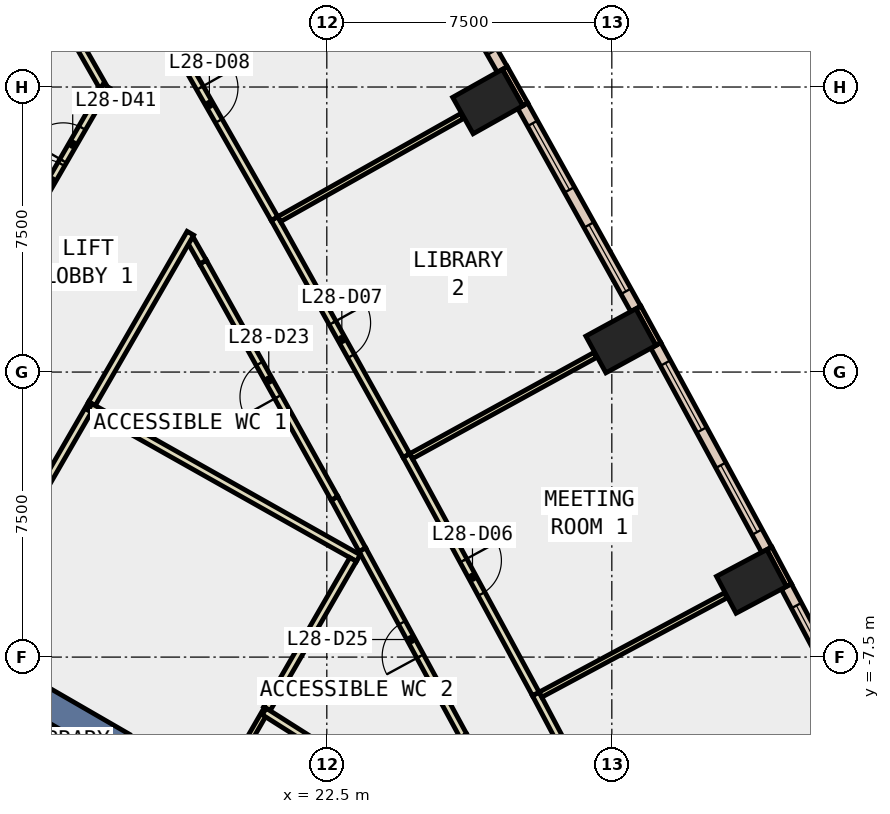
"""IFC4 building model, lengths in metres.
Left out: names, types, materials, properties, quantities, classifications, styles, units other than length and angle.
Written with IfcOpenShell. Run it as: python <this file> out.ifc"""

import sys

from ifc_helpers import new_model, si_unit, direction, frame, frame_2d, origin, origin_2d, place, context, subcontext, project, spatial, rectangle, extrude, element, fill, save


model = new_model("IFC4")
c1 = context("Model", 3, precision=1e-05, world=origin(), true_north=direction((0.0, 1.0)))
c2 = subcontext(c1, "Body", "Model", "MODEL_VIEW")
j1 = project(units=[si_unit("LENGTHUNIT", "METRE"), si_unit("PLANEANGLEUNIT", "RADIAN")], contexts=[c1])
p1 = place(None, origin())
s1 = spatial("IfcSite", under=j1, at=p1, CompositionType="ELEMENT")
p2 = place(p1, origin())
s2 = spatial("IfcBuilding", under=s1, at=p2, CompositionType="ELEMENT")
p3 = place(p2, frame((0.0, 0.0, 128.6)))
s3 = spatial("IfcBuildingStorey", under=s2, at=p3, CompositionType="ELEMENT", Elevation=128.6)
for number, where, z_axis, x_axis in (
    (1, (33.674, -5.509, -0.4), (0.0, 0.0, 1.0), (-0.469, 0.883, 0.0)),
    (2, (30.238, 0.822, -0.4), (0.0, 0.0, 1.0), (-0.48, 0.877, 0.0)),
    (3, (26.735, 7.117, -0.4), (0.0, 0.0, 1.0), (-0.49, 0.872, 0.0)),
):
    element("IfcColumn", number, at=place(p3, frame(where, z_axis=z_axis, x_axis=x_axis)), inside=s3, PredefinedType="COLUMN", context=c2, shape_type="SweptSolid", body=[
        extrude(rectangle(XDim=1.1, YDim=1.5, at=origin_2d()), origin(), (0.0, 0.0, 1.0), 4.0),
    ])
p4 = place(p3, frame((9.31, -5.375, -0.4), z_axis=(0.0, 0.0, 1.0), x_axis=(0.866017533419, -0.500013631625, 0.0)))
e4 = element("IfcWall", 4, at=p4, inside=s3, PredefinedType="SHEAR", context=c2, shape_type="SweptSolid", body=[
    extrude(rectangle(XDim=9.0, YDim=0.8, at=frame_2d((4.5, 0.0))), origin(), (0.0, 0.0, 1.0), 4.0),
])
p5 = place(p3, frame((34.661, -5.608, 0.0), z_axis=(0.0, 0.0, 1.0), x_axis=(-0.46919310775, 0.883095593716, 0.0)))
e5 = element("IfcWall", 5, at=p5, inside=s3, PredefinedType="STANDARD", context=c2, shape_type="SweptSolid", body=[
    extrude(rectangle(XDim=1.099, YDim=0.15, at=frame_2d((0.55, 0.0))), origin(), (0.0, 0.0, 1.0), 3.6),
])
p6 = place(p3, frame((31.226, 0.735, 0.0), z_axis=(0.0, 0.0, 1.0), x_axis=(-0.479737645119, 0.877411985247, 0.0)))
e6 = element("IfcWall", 6, at=p6, inside=s3, PredefinedType="STANDARD", context=c2, shape_type="SweptSolid", body=[
    extrude(rectangle(XDim=1.101, YDim=0.15, at=frame_2d((0.55, 0.0))), origin(), (0.0, 0.0, 1.0), 3.6),
])
p7 = place(p3, frame((27.724, 7.042, 0.0), z_axis=(0.0, 0.0, 1.0), x_axis=(-0.490008344094, 0.871717742574, 0.0)))
e7 = element("IfcWall", 7, at=p7, inside=s3, PredefinedType="STANDARD", context=c2, shape_type="SweptSolid", body=[
    extrude(rectangle(XDim=1.1, YDim=0.15, at=frame_2d((0.55, 0.0))), origin(), (0.0, 0.0, 1.0), 3.6),
])
p8 = place(p3, frame((37.523, -11.181, 0.0), z_axis=(0.0, 0.0, 1.0), x_axis=(-0.467654949391, 0.883911108828, 0.0)))
e8 = element("IfcWall", 8, at=p8, inside=s3, PredefinedType="STANDARD", context=c2, shape_type="SweptSolid", body=[
    extrude(rectangle(XDim=6.265, YDim=0.3, at=frame_2d((3.133, 0.0))), origin(), (0.0, 0.0, 1.0), 3.6),
])
p9 = place(p8, frame((0.566, 0.0, 0.9)))
e9 = element("IfcOpeningElement", 9, at=p9, cuts=e8, PredefinedType="OPENING", context=c2, shape_type="SweptSolid", body=[
    extrude(rectangle(XDim=2.0, YDim=2.6, at=frame_2d((1.0, 1.3))), frame((0.0, 0.16, 0.0), z_axis=(0.0, -1.0, 0.0), x_axis=(1.0, 0.0, 0.0)), (0.0, 0.0, 1.0), 0.32),
])
p10 = place(p8, frame((3.699, 0.0, 0.9)))
e10 = element("IfcOpeningElement", 10, at=p10, cuts=e8, PredefinedType="OPENING", context=c2, shape_type="SweptSolid", body=[
    extrude(rectangle(XDim=2.0, YDim=2.6, at=frame_2d((1.0, 1.3))), frame((0.0, 0.16, 0.0), z_axis=(0.0, -1.0, 0.0), x_axis=(1.0, 0.0, 0.0)), (0.0, 0.0, 1.0), 0.32),
])
p11 = place(p3, frame((34.075, -4.675, 0.0), z_axis=(0.0, 0.0, 1.0), x_axis=(-0.476982616152, 0.878912728255, 0.0)))
e11 = element("IfcWall", 11, at=p11, inside=s3, PredefinedType="STANDARD", context=c2, shape_type="SweptSolid", body=[
    extrude(rectangle(XDim=6.115, YDim=0.3, at=frame_2d((3.058, 0.0))), origin(), (0.0, 0.0, 1.0), 3.6),
])
p12 = place(p11, frame((0.529, 0.0, 0.9)))
e12 = element("IfcOpeningElement", 12, at=p12, cuts=e11, PredefinedType="OPENING", context=c2, shape_type="SweptSolid", body=[
    extrude(rectangle(XDim=2.0, YDim=2.6, at=frame_2d((1.0, 1.3))), frame((0.0, 0.16, 0.0), z_axis=(0.0, -1.0, 0.0), x_axis=(1.0, 0.0, 0.0)), (0.0, 0.0, 1.0), 0.32),
])
p13 = place(p11, frame((3.587, 0.0, 0.9)))
e13 = element("IfcOpeningElement", 13, at=p13, cuts=e11, PredefinedType="OPENING", context=c2, shape_type="SweptSolid", body=[
    extrude(rectangle(XDim=2.0, YDim=2.6, at=frame_2d((1.0, 1.3))), frame((0.0, 0.16, 0.0), z_axis=(0.0, -1.0, 0.0), x_axis=(1.0, 0.0, 0.0)), (0.0, 0.0, 1.0), 0.32),
])
p14 = place(p3, frame((30.629, 1.662, 0.0), z_axis=(0.0, 0.0, 1.0), x_axis=(-0.486229342917, 0.873831234327, 0.0)))
e14 = element("IfcWall", 14, at=p14, inside=s3, PredefinedType="STANDARD", context=c2, shape_type="SweptSolid", body=[
    extrude(rectangle(XDim=6.114, YDim=0.3, at=frame_2d((3.057, 0.0))), origin(), (0.0, 0.0, 1.0), 3.6),
])
p15 = place(p14, frame((0.529, 0.0, 0.9)))
e15 = element("IfcOpeningElement", 15, at=p15, cuts=e14, PredefinedType="OPENING", context=c2, shape_type="SweptSolid", body=[
    extrude(rectangle(XDim=2.0, YDim=2.6, at=frame_2d((1.0, 1.3))), frame((0.0, 0.16, 0.0), z_axis=(0.0, -1.0, 0.0), x_axis=(1.0, 0.0, 0.0)), (0.0, 0.0, 1.0), 0.32),
])
p16 = place(p14, frame((3.586, 0.0, 0.9)))
e16 = element("IfcOpeningElement", 16, at=p16, cuts=e14, PredefinedType="OPENING", context=c2, shape_type="SweptSolid", body=[
    extrude(rectangle(XDim=2.0, YDim=2.6, at=frame_2d((1.0, 1.3))), frame((0.0, 0.16, 0.0), z_axis=(0.0, -1.0, 0.0), x_axis=(1.0, 0.0, 0.0)), (0.0, 0.0, 1.0), 0.32),
])
p17 = place(p3, frame((27.117, 7.961, 0.0), z_axis=(0.0, 0.0, 1.0), x_axis=(-0.495472401298, 0.868623681206, 0.0)))
e17 = element("IfcWall", 17, at=p17, inside=s3, PredefinedType="STANDARD", context=c2, shape_type="SweptSolid", body=[
    extrude(rectangle(XDim=6.115, YDim=0.3, at=frame_2d((3.058, 0.0))), origin(), (0.0, 0.0, 1.0), 3.6),
])
p18 = place(p17, frame((0.529, 0.0, 0.9)))
e18 = element("IfcOpeningElement", 18, at=p18, cuts=e17, PredefinedType="OPENING", context=c2, shape_type="SweptSolid", body=[
    extrude(rectangle(XDim=2.0, YDim=2.6, at=frame_2d((1.0, 1.3))), frame((0.0, 0.16, 0.0), z_axis=(0.0, -1.0, 0.0), x_axis=(1.0, 0.0, 0.0)), (0.0, 0.0, 1.0), 0.32),
])
p19 = place(p17, frame((3.587, 0.0, 0.9)))
e19 = element("IfcOpeningElement", 19, at=p19, cuts=e17, PredefinedType="OPENING", context=c2, shape_type="SweptSolid", body=[
    extrude(rectangle(XDim=2.0, YDim=2.6, at=frame_2d((1.0, 1.3))), frame((0.0, 0.16, 0.0), z_axis=(0.0, -1.0, 0.0), x_axis=(1.0, 0.0, 0.0)), (0.0, 0.0, 1.0), 0.32),
])
p20 = place(p3, frame((16.601, 7.526, 0.0), z_axis=(0.0, 0.0, 1.0), x_axis=(-0.495652400286, 0.868520983103, 0.0)))
e20 = element("IfcWall", 20, at=p20, inside=s3, PredefinedType="PARTITIONING", context=c2, shape_type="SweptSolid", body=[
    extrude(rectangle(XDim=1.784, YDim=0.2, at=frame_2d((0.892, 0.0))), origin(), (0.0, 0.0, 1.0), 3.6),
])
p21 = place(p3, frame((23.437, -4.676, 0.0), z_axis=(0.0, 0.0, 1.0), x_axis=(-0.47686467088, 0.878976726465, 0.0)))
e21 = element("IfcWall", 21, at=p21, inside=s3, PredefinedType="PARTITIONING", context=c2, shape_type="SweptSolid", body=[
    extrude(rectangle(XDim=1.542, YDim=0.2, at=frame_2d((0.771, 0.0))), origin(), (0.0, 0.0, 1.0), 3.6),
])
p22 = place(p3, frame((22.702, -3.321, 0.0), z_axis=(0.0, 0.0, 1.0), x_axis=(-0.486304341235, 0.873789498504, 0.0)))
e22 = element("IfcWall", 22, at=p22, inside=s3, PredefinedType="PARTITIONING", context=c2, shape_type="SweptSolid", body=[
    extrude(rectangle(XDim=7.113, YDim=0.2, at=frame_2d((3.556, 0.0))), origin(), (0.0, 0.0, 1.0), 3.6),
])
p23 = place(p22, frame((3.057, 0.0, 0.0)))
e23 = element("IfcOpeningElement", 23, at=p23, cuts=e22, PredefinedType="OPENING", context=c2, shape_type="SweptSolid", body=[
    extrude(rectangle(XDim=1.0, YDim=2.1, at=frame_2d((0.5, 1.05))), frame((0.0, 0.11, 0.0), z_axis=(0.0, -1.0, 0.0), x_axis=(1.0, 0.0, 0.0)), (0.0, 0.0, 1.0), 0.22),
])
p24 = place(p3, frame((19.243, 2.894, 0.0), z_axis=(0.0, 0.0, 1.0), x_axis=(-0.494108984218, 0.869399972231, 0.0)))
e24 = element("IfcWall", 24, at=p24, inside=s3, PredefinedType="PARTITIONING", context=c2, shape_type="SweptSolid", body=[
    extrude(rectangle(XDim=0.674, YDim=0.2, at=frame_2d((0.337, 0.0))), origin(), (0.0, 0.0, 1.0), 3.6),
])
p25 = place(p3, frame((28.177, -13.51, 0.0), z_axis=(0.0, 0.0, 1.0), x_axis=(-0.467580354248, 0.883950571198, 0.0)))
e25 = element("IfcWall", 25, at=p25, inside=s3, PredefinedType="PARTITIONING", context=c2, shape_type="SweptSolid", body=[
    extrude(rectangle(XDim=4.453, YDim=0.2, at=frame_2d((2.227, 0.0))), origin(), (0.0, 0.0, 1.0), 3.6),
])
p26 = place(p3, frame((26.095, -9.574, 0.0), z_axis=(0.0, 0.0, 1.0), x_axis=(-0.476963271937, 0.878923226012, 0.0)))
e26 = element("IfcWall", 26, at=p26, inside=s3, PredefinedType="PARTITIONING", context=c2, shape_type="SweptSolid", body=[
    extrude(rectangle(XDim=5.573, YDim=0.2, at=frame_2d((2.786, 0.0))), origin(), (0.0, 0.0, 1.0), 3.6),
])
p27 = place(p26, frame((2.386, 0.0, 0.0)))
e27 = element("IfcOpeningElement", 27, at=p27, cuts=e26, PredefinedType="OPENING", context=c2, shape_type="SweptSolid", body=[
    extrude(rectangle(XDim=1.0, YDim=2.1, at=frame_2d((0.5, 1.05))), frame((0.0, 0.11, 0.0), z_axis=(0.0, -1.0, 0.0), x_axis=(1.0, 0.0, 0.0)), (0.0, 0.0, 1.0), 0.22),
])
p28 = place(p3, frame((27.999, -8.469, 0.0), z_axis=(0.0, 0.0, 1.0), x_axis=(0.467683043694, -0.883896244274, 0.0)))
e28 = element("IfcWall", 28, at=p28, inside=s3, PredefinedType="PARTITIONING", context=c2, shape_type="SweptSolid", body=[
    extrude(rectangle(XDim=7.015, YDim=0.2, at=frame_2d((3.508, 0.0))), origin(), (0.0, 0.0, 1.0), 3.6),
])
p29 = place(p28, frame((3.008, 0.0, 0.0)))
e29 = element("IfcOpeningElement", 29, at=p29, cuts=e28, PredefinedType="OPENING", context=c2, shape_type="SweptSolid", body=[
    extrude(rectangle(XDim=1.0, YDim=2.1, at=frame_2d((0.5, 1.05))), frame((0.0, 0.11, 0.0), z_axis=(0.0, -1.0, 0.0), x_axis=(1.0, 0.0, 0.0)), (0.0, 0.0, 1.0), 0.22),
])
p30 = place(p3, frame((24.595, -2.196, 0.0), z_axis=(0.0, 0.0, 1.0), x_axis=(0.47695522124, -0.878927594818, 0.0)))
e30 = element("IfcWall", 30, at=p30, inside=s3, PredefinedType="PARTITIONING", context=c2, shape_type="SweptSolid", body=[
    extrude(rectangle(XDim=7.137, YDim=0.2, at=frame_2d((3.568, 0.0))), origin(), (0.0, 0.0, 1.0), 3.6),
])
p31 = place(p30, frame((3.144, 0.0, 0.0)))
e31 = element("IfcOpeningElement", 31, at=p31, cuts=e30, PredefinedType="OPENING", context=c2, shape_type="SweptSolid", body=[
    extrude(rectangle(XDim=1.0, YDim=2.1, at=frame_2d((0.5, 1.05))), frame((0.0, 0.11, 0.0), z_axis=(0.0, -1.0, 0.0), x_axis=(1.0, 0.0, 0.0)), (0.0, 0.0, 1.0), 0.22),
])
p32 = place(p3, frame((21.124, 4.04, 0.0), z_axis=(0.0, 0.0, 1.0), x_axis=(0.486229558972, -0.873831114107, 0.0)))
e32 = element("IfcWall", 32, at=p32, inside=s3, PredefinedType="PARTITIONING", context=c2, shape_type="SweptSolid", body=[
    extrude(rectangle(XDim=7.136, YDim=0.2, at=frame_2d((3.568, 0.0))), origin(), (0.0, 0.0, 1.0), 3.6),
])
p33 = place(p32, frame((3.143, 0.0, 0.0)))
e33 = element("IfcOpeningElement", 33, at=p33, cuts=e32, PredefinedType="OPENING", context=c2, shape_type="SweptSolid", body=[
    extrude(rectangle(XDim=1.0, YDim=2.1, at=frame_2d((0.5, 1.05))), frame((0.0, 0.11, 0.0), z_axis=(0.0, -1.0, 0.0), x_axis=(1.0, 0.0, 0.0)), (0.0, 0.0, 1.0), 0.22),
])
p34 = place(p3, frame((17.623, 10.175, 0.0), z_axis=(0.0, 0.0, 1.0), x_axis=(0.4954688358, -0.868625714995, 0.0)))
e34 = element("IfcWall", 34, at=p34, inside=s3, PredefinedType="PARTITIONING", context=c2, shape_type="SweptSolid", body=[
    extrude(rectangle(XDim=7.064, YDim=0.2, at=frame_2d((3.532, 0.0))), origin(), (0.0, 0.0, 1.0), 3.6),
])
p35 = place(p34, frame((3.107, 0.0, 0.0)))
e35 = element("IfcOpeningElement", 35, at=p35, cuts=e34, PredefinedType="OPENING", context=c2, shape_type="SweptSolid", body=[
    extrude(rectangle(XDim=1.0, YDim=2.1, at=frame_2d((0.5, 1.05))), frame((0.0, 0.11, 0.0), z_axis=(0.0, -1.0, 0.0), x_axis=(1.0, 0.0, 0.0)), (0.0, 0.0, 1.0), 0.22),
])
p36 = place(p3, frame((11.261, 6.994, 0.0), z_axis=(0.0, 0.0, 1.0), x_axis=(0.866013769041, 0.500020151426, 0.0)))
e36 = element("IfcWall", 36, at=p36, inside=s3, PredefinedType="PARTITIONING", context=c2, shape_type="SweptSolid", body=[
    extrude(rectangle(XDim=4.898, YDim=0.15, at=frame_2d((2.449, 0.0))), origin(), (0.0, 0.0, 1.0), 3.6),
])
p37 = place(p3, frame((13.827, 2.55, 0.0), z_axis=(0.0, 0.0, 1.0), x_axis=(0.500032637853, 0.866006559491, 0.0)))
e37 = element("IfcWall", 37, at=p37, inside=s3, PredefinedType="PARTITIONING", context=c2, shape_type="SweptSolid", body=[
    extrude(rectangle(XDim=5.746, YDim=0.2, at=frame_2d((2.873, 0.0))), origin(), (0.0, 0.0, 1.0), 3.6),
])
p38 = place(p37, frame((2.373, 0.0, 0.0)))
e38 = element("IfcOpeningElement", 38, at=p38, cuts=e37, PredefinedType="OPENING", context=c2, shape_type="SweptSolid", body=[
    extrude(rectangle(XDim=1.0, YDim=2.1, at=frame_2d((0.5, 1.05))), frame((0.0, 0.11, 0.0), z_axis=(0.0, -1.0, 0.0), x_axis=(1.0, 0.0, 0.0)), (0.0, 0.0, 1.0), 0.22),
])
p39 = place(p37, frame((3.473, 0.0, 0.0)))
e39 = element("IfcOpeningElement", 39, at=p39, cuts=e37, PredefinedType="OPENING", context=c2, shape_type="SweptSolid", body=[
    extrude(rectangle(XDim=1.0, YDim=2.1, at=frame_2d((0.5, 1.05))), frame((0.0, 0.11, 0.0), z_axis=(0.0, -1.0, 0.0), x_axis=(1.0, 0.0, 0.0)), (0.0, 0.0, 1.0), 0.22),
])
p40 = place(p3, frame((16.32, -0.832, 0.0), z_axis=(0.0, 0.0, 1.0), x_axis=(-0.499951642806, -0.866053321023, 0.0)))
e40 = element("IfcWall", 40, at=p40, inside=s3, PredefinedType="PARTITIONING", context=c2, shape_type="SweptSolid", body=[
    extrude(rectangle(XDim=7.039, YDim=0.2, at=frame_2d((3.52, 0.0))), origin(), (0.0, 0.0, 1.0), 3.6),
])
p41 = place(p3, frame((18.91, 3.653, 0.0), z_axis=(0.0, 0.0, 1.0), x_axis=(-0.500052967229, -0.865994820981, 0.0)))
e41 = element("IfcWall", 41, at=p41, inside=s3, PredefinedType="PARTITIONING", context=c2, shape_type="SweptSolid", body=[
    extrude(rectangle(XDim=5.179, YDim=0.2, at=frame_2d((2.59, 0.0))), origin(), (0.0, 0.0, 1.0), 3.6),
])
p42 = place(p3, frame((16.27, -0.919, 0.0), z_axis=(0.0, 0.0, 1.0), x_axis=(0.871308980511, -0.490734816863, 0.0)))
e42 = element("IfcWall", 42, at=p42, inside=s3, PredefinedType="PARTITIONING", context=c2, shape_type="SweptSolid", body=[
    extrude(rectangle(XDim=8.1, YDim=0.2, at=frame_2d((4.05, 0.0))), origin(), (0.0, 0.0, 1.0), 3.6),
])
p43 = place(p3, frame((20.924, -8.858, 0.0), z_axis=(0.0, 0.0, 1.0), x_axis=(-0.499996828157, -0.866027235041, 0.0)))
e43 = element("IfcWall", 43, at=p43, inside=s3, PredefinedType="PARTITIONING", context=c2, shape_type="SweptSolid", body=[
    extrude(rectangle(XDim=11.04, YDim=0.15, at=frame_2d((5.52, 0.0))), origin(), (0.0, 0.0, 1.0), 3.6),
])
p44 = place(p3, frame((23.191, -4.932, 0.0), z_axis=(0.0, 0.0, 1.0), x_axis=(-0.500025458316, -0.86601070492, 0.0)))
e44 = element("IfcWall", 44, at=p44, inside=s3, PredefinedType="PARTITIONING", context=c2, shape_type="SweptSolid", body=[
    extrude(rectangle(XDim=4.533, YDim=0.2, at=frame_2d((2.267, 0.0))), origin(), (0.0, 0.0, 1.0), 3.6),
])
p45 = place(p3, frame((20.853, -8.931, 0.0), z_axis=(0.0, 0.0, 1.0), x_axis=(0.844869091455, -0.534973100542, 0.0)))
e45 = element("IfcWall", 45, at=p45, inside=s3, PredefinedType="PARTITIONING", context=c2, shape_type="SweptSolid", body=[
    extrude(rectangle(XDim=8.825, YDim=0.2, at=frame_2d((4.413, 0.0))), origin(), (0.0, 0.0, 1.0), 3.6),
])
p46 = place(p3, frame((28.123, -8.488, 0.0), z_axis=(0.0, 0.0, 1.0), x_axis=(0.881406449288, 0.472358625573, 0.0)))
e46 = element("IfcWall", 46, at=p46, inside=s3, PredefinedType="PARTITIONING", context=c2, shape_type="SweptSolid", body=[
    extrude(rectangle(XDim=5.53, YDim=0.15, at=frame_2d((2.765, 0.0))), origin(), (0.0, 0.0, 1.0), 3.6),
])
p47 = place(p3, frame((24.718, -2.214, 0.0), z_axis=(0.0, 0.0, 1.0), x_axis=(0.876382720351, 0.481615331432, 0.0)))
e47 = element("IfcWall", 47, at=p47, inside=s3, PredefinedType="PARTITIONING", context=c2, shape_type="SweptSolid", body=[
    extrude(rectangle(XDim=5.53, YDim=0.15, at=frame_2d((2.765, 0.0))), origin(), (0.0, 0.0, 1.0), 3.6),
])
p48 = place(p3, frame((21.247, 4.024, 0.0), z_axis=(0.0, 0.0, 1.0), x_axis=(0.871261721438, 0.490818716795, 0.0)))
e48 = element("IfcWall", 48, at=p48, inside=s3, PredefinedType="PARTITIONING", context=c2, shape_type="SweptSolid", body=[
    extrude(rectangle(XDim=5.53, YDim=0.15, at=frame_2d((2.765, 0.0))), origin(), (0.0, 0.0, 1.0), 3.6),
])
p49 = place(p10, origin())
e49 = element("IfcWindow", 49, at=p49, inside=s3, PartitioningType="SINGLE_PANEL", PredefinedType="WINDOW", context=c2, shape_type="SweptSolid", body=[
    extrude(rectangle(XDim=2.0, YDim=2.6, at=frame_2d((1.0, 1.3))), frame((0.0, 0.03, 0.0), z_axis=(0.0, -1.0, 0.0), x_axis=(1.0, 0.0, 0.0)), (0.0, 0.0, 1.0), 0.06),
])
fill(e10, e49)
p50 = place(p12, origin())
e50 = element("IfcWindow", 50, at=p50, inside=s3, PartitioningType="SINGLE_PANEL", PredefinedType="WINDOW", context=c2, shape_type="SweptSolid", body=[
    extrude(rectangle(XDim=2.0, YDim=2.6, at=frame_2d((1.0, 1.3))), frame((0.0, 0.03, 0.0), z_axis=(0.0, -1.0, 0.0), x_axis=(1.0, 0.0, 0.0)), (0.0, 0.0, 1.0), 0.06),
])
fill(e12, e50)
p51 = place(p13, origin())
e51 = element("IfcWindow", 51, at=p51, inside=s3, PartitioningType="SINGLE_PANEL", PredefinedType="WINDOW", context=c2, shape_type="SweptSolid", body=[
    extrude(rectangle(XDim=2.0, YDim=2.6, at=frame_2d((1.0, 1.3))), frame((0.0, 0.03, 0.0), z_axis=(0.0, -1.0, 0.0), x_axis=(1.0, 0.0, 0.0)), (0.0, 0.0, 1.0), 0.06),
])
fill(e13, e51)
p52 = place(p15, origin())
e52 = element("IfcWindow", 52, at=p52, inside=s3, PartitioningType="SINGLE_PANEL", PredefinedType="WINDOW", context=c2, shape_type="SweptSolid", body=[
    extrude(rectangle(XDim=2.0, YDim=2.6, at=frame_2d((1.0, 1.3))), frame((0.0, 0.03, 0.0), z_axis=(0.0, -1.0, 0.0), x_axis=(1.0, 0.0, 0.0)), (0.0, 0.0, 1.0), 0.06),
])
fill(e15, e52)
p53 = place(p16, origin())
e53 = element("IfcWindow", 53, at=p53, inside=s3, PartitioningType="SINGLE_PANEL", PredefinedType="WINDOW", context=c2, shape_type="SweptSolid", body=[
    extrude(rectangle(XDim=2.0, YDim=2.6, at=frame_2d((1.0, 1.3))), frame((0.0, 0.03, 0.0), z_axis=(0.0, -1.0, 0.0), x_axis=(1.0, 0.0, 0.0)), (0.0, 0.0, 1.0), 0.06),
])
fill(e16, e53)
p54 = place(p18, origin())
e54 = element("IfcWindow", 54, at=p54, inside=s3, PartitioningType="SINGLE_PANEL", PredefinedType="WINDOW", context=c2, shape_type="SweptSolid", body=[
    extrude(rectangle(XDim=2.0, YDim=2.6, at=frame_2d((1.0, 1.3))), frame((0.0, 0.03, 0.0), z_axis=(0.0, -1.0, 0.0), x_axis=(1.0, 0.0, 0.0)), (0.0, 0.0, 1.0), 0.06),
])
fill(e18, e54)
p55 = place(p31, origin())
e55 = element("IfcDoor", 55, at=p55, inside=s3, OperationType="SINGLE_SWING_LEFT", PredefinedType="DOOR", context=c2, shape_type="SweptSolid", body=[
    extrude(rectangle(XDim=1.0, YDim=2.1, at=frame_2d((0.5, 1.05))), frame((0.0, 0.025, 0.0), z_axis=(0.0, -1.0, 0.0), x_axis=(1.0, 0.0, 0.0)), (0.0, 0.0, 1.0), 0.05),
])
fill(e31, e55)
p56 = place(p33, origin())
e56 = element("IfcDoor", 56, at=p56, inside=s3, OperationType="SINGLE_SWING_RIGHT", PredefinedType="DOOR", context=c2, shape_type="SweptSolid", body=[
    extrude(rectangle(XDim=1.0, YDim=2.1, at=frame_2d((0.5, 1.05))), frame((0.0, 0.025, 0.0), z_axis=(0.0, -1.0, 0.0), x_axis=(1.0, 0.0, 0.0)), (0.0, 0.0, 1.0), 0.05),
])
fill(e33, e56)
p57 = place(p35, origin())
e57 = element("IfcDoor", 57, at=p57, inside=s3, OperationType="SINGLE_SWING_LEFT", PredefinedType="DOOR", context=c2, shape_type="SweptSolid", body=[
    extrude(rectangle(XDim=1.0, YDim=2.1, at=frame_2d((0.5, 1.05))), frame((0.0, 0.025, 0.0), z_axis=(0.0, -1.0, 0.0), x_axis=(1.0, 0.0, 0.0)), (0.0, 0.0, 1.0), 0.05),
])
fill(e35, e57)
p58 = place(p23, origin())
e58 = element("IfcDoor", 58, at=p58, inside=s3, OperationType="SINGLE_SWING_LEFT", PredefinedType="DOOR", context=c2, shape_type="SweptSolid", body=[
    extrude(rectangle(XDim=1.0, YDim=2.1, at=frame_2d((0.5, 1.05))), frame((0.0, 0.025, 0.0), z_axis=(0.0, -1.0, 0.0), x_axis=(1.0, 0.0, 0.0)), (0.0, 0.0, 1.0), 0.05),
])
fill(e23, e58)
p59 = place(p27, origin())
e59 = element("IfcDoor", 59, at=p59, inside=s3, OperationType="SINGLE_SWING_LEFT", PredefinedType="DOOR", context=c2, shape_type="SweptSolid", body=[
    extrude(rectangle(XDim=1.0, YDim=2.1, at=frame_2d((0.5, 1.05))), frame((0.0, 0.025, 0.0), z_axis=(0.0, -1.0, 0.0), x_axis=(1.0, 0.0, 0.0)), (0.0, 0.0, 1.0), 0.05),
])
fill(e27, e59)
p60 = place(p38, origin())
e60 = element("IfcDoor", 60, at=p60, inside=s3, OperationType="SINGLE_SWING_LEFT", PredefinedType="DOOR", context=c2, shape_type="SweptSolid", body=[
    extrude(rectangle(XDim=1.0, YDim=2.1, at=frame_2d((0.5, 1.05))), frame((0.0, 0.025, 0.0), z_axis=(0.0, -1.0, 0.0), x_axis=(1.0, 0.0, 0.0)), (0.0, 0.0, 1.0), 0.05),
])
fill(e38, e60)
p61 = place(p39, origin())
e61 = element("IfcDoor", 61, at=p61, inside=s3, OperationType="SINGLE_SWING_RIGHT", PredefinedType="DOOR", context=c2, shape_type="SweptSolid", body=[
    extrude(rectangle(XDim=1.0, YDim=2.1, at=frame_2d((0.5, 1.05))), frame((0.0, 0.025, 0.0), z_axis=(0.0, -1.0, 0.0), x_axis=(1.0, 0.0, 0.0)), (0.0, 0.0, 1.0), 0.05),
])
fill(e39, e61)
save(model, sys.argv[1])
